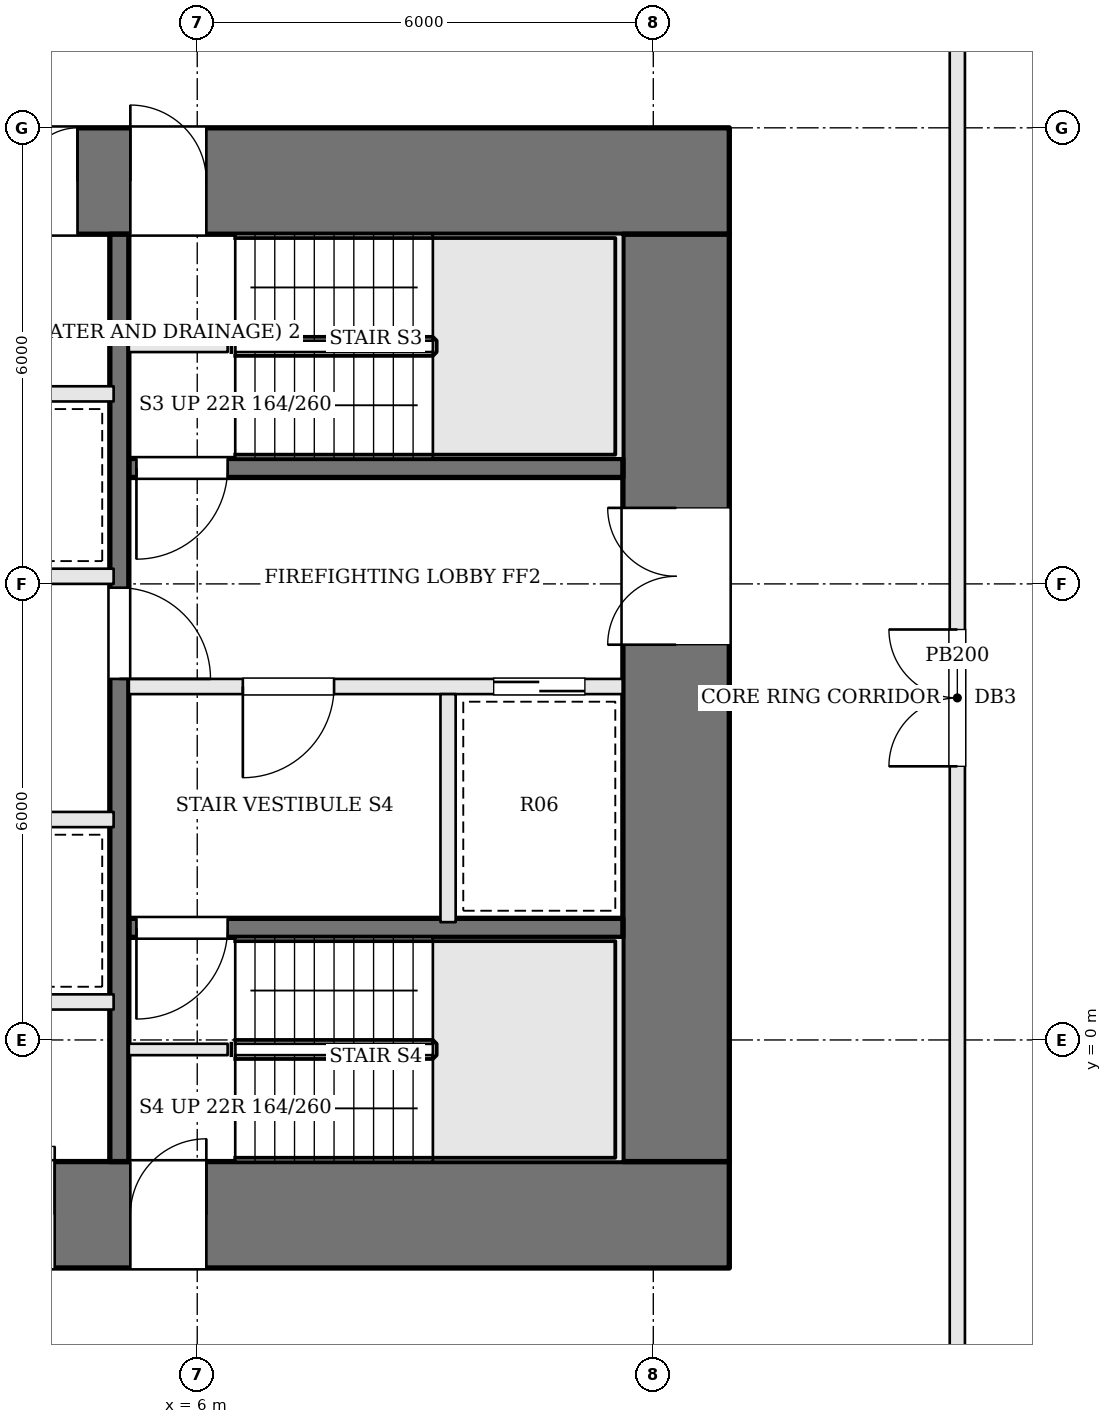
"""IFC4 building model, lengths in metres.
Left out: names, types, materials, properties, quantities, classifications, styles, units other than length and angle.
Written with IfcOpenShell. Run it as: python <this file> out.ifc"""

import sys

from ifc_helpers import new_model, si_unit, direction, frame, frame_2d, origin, place, context, subcontext, project, spatial, rectangle, extrude, element, fill, save


model = new_model("IFC4")
c1 = context("Model", 3, precision=1e-05, world=origin(), true_north=direction((0.0, 1.0)))
c2 = subcontext(c1, "Body", "Model", "MODEL_VIEW")
j1 = project(units=[si_unit("LENGTHUNIT", "METRE"), si_unit("PLANEANGLEUNIT", "RADIAN")], contexts=[c1])
p1 = place(None, origin())
s1 = spatial("IfcSite", under=j1, at=p1, CompositionType="ELEMENT")
p2 = place(p1, origin())
s2 = spatial("IfcBuilding", under=s1, at=p2, CompositionType="ELEMENT")
p3 = place(p2, frame((0.0, 0.0, 55.5)))
s3 = spatial("IfcBuildingStorey", under=s2, at=p3, CompositionType="ELEMENT", Elevation=55.5)
p4 = place(p3, frame((-13.0, 11.3, 0.0), z_axis=(0.0, 0.0, 1.0), x_axis=(1.0, 0.0, 0.0)))
e1 = element("IfcWall", 1, at=p4, inside=s3, PredefinedType="SHEAR", context=c2, shape_type="SweptSolid", body=[
    extrude(rectangle(XDim=26.0, YDim=1.4, at=frame_2d((13.0, 0.0))), origin(), (0.0, 0.0, 1.0), 3.6),
])
p5 = place(p4, frame((8.875, 0.0, 0.0)))
e2 = element("IfcOpeningElement", 2, at=p5, cuts=e1, PredefinedType="OPENING", context=c2, shape_type="SweptSolid", body=[
    extrude(rectangle(XDim=0.9, YDim=2.1, at=frame_2d((0.45, 1.05))), frame((0.0, 0.71, 0.0), z_axis=(0.0, -1.0, 0.0), x_axis=(1.0, 0.0, 0.0)), (0.0, 0.0, 1.0), 1.42),
])
p6 = place(p4, frame((11.425, 0.0, 0.0)))
e3 = element("IfcOpeningElement", 3, at=p6, cuts=e1, PredefinedType="OPENING", context=c2, shape_type="SweptSolid", body=[
    extrude(rectangle(XDim=0.7, YDim=2.1, at=frame_2d((0.35, 1.05))), frame((0.0, 0.71, 0.0), z_axis=(0.0, -1.0, 0.0), x_axis=(1.0, 0.0, 0.0)), (0.0, 0.0, 1.0), 1.42),
])
p7 = place(p4, frame((14.125, 0.0, 0.0)))
e4 = element("IfcOpeningElement", 4, at=p7, cuts=e1, PredefinedType="OPENING", context=c2, shape_type="SweptSolid", body=[
    extrude(rectangle(XDim=1.0, YDim=2.1, at=frame_2d((0.5, 1.05))), frame((0.0, 0.71, 0.0), z_axis=(0.0, -1.0, 0.0), x_axis=(1.0, 0.0, 0.0)), (0.0, 0.0, 1.0), 1.42),
])
p8 = place(p4, frame((16.725, 0.0, 0.0)))
e5 = element("IfcOpeningElement", 5, at=p8, cuts=e1, PredefinedType="OPENING", context=c2, shape_type="SweptSolid", body=[
    extrude(rectangle(XDim=0.7, YDim=2.1, at=frame_2d((0.35, 1.05))), frame((0.0, 0.71, 0.0), z_axis=(0.0, -1.0, 0.0), x_axis=(1.0, 0.0, 0.0)), (0.0, 0.0, 1.0), 1.42),
])
p9 = place(p4, frame((6.88, 0.0, 0.0)))
e6 = element("IfcOpeningElement", 6, at=p9, cuts=e1, PredefinedType="OPENING", context=c2, shape_type="SweptSolid", body=[
    extrude(rectangle(XDim=1.0, YDim=2.1, at=frame_2d((0.5, 1.05))), frame((0.0, 0.71, 0.0), z_axis=(0.0, -1.0, 0.0), x_axis=(1.0, 0.0, 0.0)), (0.0, 0.0, 1.0), 1.42),
])
p10 = place(p4, frame((18.12, 0.0, 0.0)))
e7 = element("IfcOpeningElement", 7, at=p10, cuts=e1, PredefinedType="OPENING", context=c2, shape_type="SweptSolid", body=[
    extrude(rectangle(XDim=1.0, YDim=2.1, at=frame_2d((0.5, 1.05))), frame((0.0, 0.71, 0.0), z_axis=(0.0, -1.0, 0.0), x_axis=(1.0, 0.0, 0.0)), (0.0, 0.0, 1.0), 1.42),
])
p11 = place(p3, frame((-13.0, -2.3, 0.0), z_axis=(0.0, 0.0, 1.0), x_axis=(1.0, 0.0, 0.0)))
e8 = element("IfcWall", 8, at=p11, inside=s3, PredefinedType="SHEAR", context=c2, shape_type="SweptSolid", body=[
    extrude(rectangle(XDim=26.0, YDim=1.4, at=frame_2d((13.0, 0.0))), origin(), (0.0, 0.0, 1.0), 3.6),
])
p12 = place(p11, frame((9.225, 0.0, 0.0)))
e9 = element("IfcOpeningElement", 9, at=p12, cuts=e8, PredefinedType="OPENING", context=c2, shape_type="SweptSolid", body=[
    extrude(rectangle(XDim=1.0, YDim=2.1, at=frame_2d((0.5, 1.05))), frame((0.0, 0.71, 0.0), z_axis=(0.0, -1.0, 0.0), x_axis=(1.0, 0.0, 0.0)), (0.0, 0.0, 1.0), 1.42),
])
p13 = place(p11, frame((11.825, 0.0, 0.0)))
e10 = element("IfcOpeningElement", 10, at=p13, cuts=e8, PredefinedType="OPENING", context=c2, shape_type="SweptSolid", body=[
    extrude(rectangle(XDim=0.7, YDim=2.1, at=frame_2d((0.35, 1.05))), frame((0.0, 0.71, 0.0), z_axis=(0.0, -1.0, 0.0), x_axis=(1.0, 0.0, 0.0)), (0.0, 0.0, 1.0), 1.42),
])
p14 = place(p11, frame((13.875, 0.0, 0.0)))
e11 = element("IfcOpeningElement", 11, at=p14, cuts=e8, PredefinedType="OPENING", context=c2, shape_type="SweptSolid", body=[
    extrude(rectangle(XDim=0.7, YDim=2.1, at=frame_2d((0.35, 1.05))), frame((0.0, 0.71, 0.0), z_axis=(0.0, -1.0, 0.0), x_axis=(1.0, 0.0, 0.0)), (0.0, 0.0, 1.0), 1.42),
])
p15 = place(p11, frame((16.225, 0.0, 0.0)))
e12 = element("IfcOpeningElement", 12, at=p15, cuts=e8, PredefinedType="OPENING", context=c2, shape_type="SweptSolid", body=[
    extrude(rectangle(XDim=0.9, YDim=2.1, at=frame_2d((0.45, 1.05))), frame((0.0, 0.71, 0.0), z_axis=(0.0, -1.0, 0.0), x_axis=(1.0, 0.0, 0.0)), (0.0, 0.0, 1.0), 1.42),
])
p16 = place(p11, frame((6.88, 0.0, 0.0)))
e13 = element("IfcOpeningElement", 13, at=p16, cuts=e8, PredefinedType="OPENING", context=c2, shape_type="SweptSolid", body=[
    extrude(rectangle(XDim=1.0, YDim=2.1, at=frame_2d((0.5, 1.05))), frame((0.0, 0.71, 0.0), z_axis=(0.0, -1.0, 0.0), x_axis=(1.0, 0.0, 0.0)), (0.0, 0.0, 1.0), 1.42),
])
p17 = place(p11, frame((18.12, 0.0, 0.0)))
e14 = element("IfcOpeningElement", 14, at=p17, cuts=e8, PredefinedType="OPENING", context=c2, shape_type="SweptSolid", body=[
    extrude(rectangle(XDim=1.0, YDim=2.1, at=frame_2d((0.5, 1.05))), frame((0.0, 0.71, 0.0), z_axis=(0.0, -1.0, 0.0), x_axis=(1.0, 0.0, 0.0)), (0.0, 0.0, 1.0), 1.42),
])
p18 = place(p3, frame((12.3, -1.6, 0.0), z_axis=(0.0, 0.0, 1.0), x_axis=(0.0, 1.0, 0.0)))
e15 = element("IfcWall", 15, at=p18, inside=s3, PredefinedType="SHEAR", context=c2, shape_type="SweptSolid", body=[
    extrude(rectangle(XDim=12.2, YDim=1.4, at=frame_2d((6.1, 0.0))), origin(), (0.0, 0.0, 1.0), 3.6),
])
p19 = place(p18, frame((6.8, 0.0, 0.0)))
e16 = element("IfcOpeningElement", 16, at=p19, cuts=e15, PredefinedType="OPENING", context=c2, shape_type="SweptSolid", body=[
    extrude(rectangle(XDim=1.8, YDim=2.1, at=frame_2d((0.9, 1.05))), frame((0.0, 0.71, 0.0), z_axis=(0.0, -1.0, 0.0), x_axis=(1.0, 0.0, 0.0)), (0.0, 0.0, 1.0), 1.42),
])
for number, where, z_axis, x_axis in (
    (17, (6.4, 9.125, 0.0), (0.0, 0.0, 1.0), (-1.0, 0.0, 0.0)),
    (18, (6.4, -0.125, 0.0), (0.0, 0.0, 1.0), (-1.0, 0.0, 0.0)),
):
    element("IfcWall", number, at=place(p3, frame(where, z_axis=z_axis, x_axis=x_axis)), inside=s3, PredefinedType="SOLIDWALL", context=c2, shape_type="SweptSolid", body=[
        extrude(rectangle(XDim=1.3, YDim=0.15, at=frame_2d((0.65, 0.0))), origin(), (0.0, 0.0, 1.0), 3.4),
    ])
p20 = place(p3, frame((11.6, 7.525, 0.0), z_axis=(0.0, 0.0, 1.0), x_axis=(-1.0, 0.0, 0.0)))
e19 = element("IfcWall", 19, at=p20, inside=s3, PredefinedType="SOLIDWALL", context=c2, shape_type="SweptSolid", body=[
    extrude(rectangle(XDim=6.5, YDim=0.25, at=frame_2d((3.25, 0.0))), origin(), (0.0, 0.0, 1.0), 3.4),
])
p21 = place(p20, frame((5.2, 0.0, 0.0)))
e20 = element("IfcOpeningElement", 20, at=p21, cuts=e19, PredefinedType="OPENING", context=c2, shape_type="SweptSolid", body=[
    extrude(rectangle(XDim=1.2, YDim=2.1, at=frame_2d((0.6, 1.05))), frame((0.0, 0.135, 0.0), z_axis=(0.0, -1.0, 0.0), x_axis=(1.0, 0.0, 0.0)), (0.0, 0.0, 1.0), 0.27),
])
p22 = place(p3, frame((11.6, 4.65, 0.0), z_axis=(0.0, 0.0, 1.0), x_axis=(-1.0, 0.0, 0.0)))
e21 = element("IfcWall", 21, at=p22, inside=s3, PredefinedType="SOLIDWALL", context=c2, shape_type="SweptSolid", body=[
    extrude(rectangle(XDim=6.5, YDim=0.2, at=frame_2d((3.25, 0.0))), origin(), (0.0, 0.0, 1.0), 3.4),
])
p23 = place(p22, frame((3.8, 0.0, 0.0)))
e22 = element("IfcOpeningElement", 22, at=p23, cuts=e21, PredefinedType="OPENING", context=c2, shape_type="SweptSolid", body=[
    extrude(rectangle(XDim=1.2, YDim=2.1, at=frame_2d((0.6, 1.05))), frame((0.0, 0.11, 0.0), z_axis=(0.0, -1.0, 0.0), x_axis=(1.0, 0.0, 0.0)), (0.0, 0.0, 1.0), 0.22),
])
p24 = place(p22, frame((0.5, 0.0, 0.0)))
e23 = element("IfcOpeningElement", 23, at=p24, cuts=e21, PredefinedType="OPENING", context=c2, shape_type="SweptSolid", body=[
    extrude(rectangle(XDim=1.2, YDim=2.1, at=frame_2d((0.6, 1.05))), frame((0.0, 0.11, 0.0), z_axis=(0.0, -1.0, 0.0), x_axis=(1.0, 0.0, 0.0)), (0.0, 0.0, 1.0), 0.22),
])
p25 = place(p3, frame((11.6, 1.475, 0.0), z_axis=(0.0, 0.0, 1.0), x_axis=(-1.0, 0.0, 0.0)))
e24 = element("IfcWall", 24, at=p25, inside=s3, PredefinedType="SOLIDWALL", context=c2, shape_type="SweptSolid", body=[
    extrude(rectangle(XDim=6.5, YDim=0.25, at=frame_2d((3.25, 0.0))), origin(), (0.0, 0.0, 1.0), 3.4),
])
p26 = place(p25, frame((5.2, 0.0, 0.0)))
e25 = element("IfcOpeningElement", 25, at=p26, cuts=e24, PredefinedType="OPENING", context=c2, shape_type="SweptSolid", body=[
    extrude(rectangle(XDim=1.2, YDim=2.1, at=frame_2d((0.6, 1.05))), frame((0.0, 0.135, 0.0), z_axis=(0.0, -1.0, 0.0), x_axis=(1.0, 0.0, 0.0)), (0.0, 0.0, 1.0), 0.27),
])
p27 = place(p3, frame((9.3, 4.55, 0.0), z_axis=(0.0, 0.0, 1.0), x_axis=(0.0, -1.0, 0.0)))
e26 = element("IfcWall", 26, at=p27, inside=s3, PredefinedType="SOLIDWALL", context=c2, shape_type="SweptSolid", body=[
    extrude(rectangle(XDim=3.0, YDim=0.2, at=frame_2d((1.5, 0.0))), origin(), (0.0, 0.0, 1.0), 3.4),
])
p28 = place(p3, frame((4.975, 10.6, 0.0), z_axis=(0.0, 0.0, 1.0), x_axis=(0.0, -1.0, 0.0)))
e27 = element("IfcWall", 27, at=p28, inside=s3, PredefinedType="SOLIDWALL", context=c2, shape_type="SweptSolid", body=[
    extrude(rectangle(XDim=12.2, YDim=0.25, at=frame_2d((6.1, 0.0))), origin(), (0.0, 0.0, 1.0), 3.4),
])
p29 = place(p28, frame((4.65, 0.0, 0.0)))
e28 = element("IfcOpeningElement", 28, at=p29, cuts=e27, PredefinedType="OPENING", context=c2, shape_type="SweptSolid", body=[
    extrude(rectangle(XDim=1.2, YDim=2.1, at=frame_2d((0.6, 1.05))), frame((0.0, 0.135, 0.0), z_axis=(0.0, -1.0, 0.0), x_axis=(1.0, 0.0, 0.0)), (0.0, 0.0, 1.0), 0.27),
])
for number, where, z_axis, x_axis in (
    (29, (-4.9, 0.5, 0.0), (0.0, 0.0, 1.0), (1.0, 0.0, 0.0)),
    (30, (-4.9, 2.9, 0.0), (0.0, 0.0, 1.0), (1.0, 0.0, 0.0)),
    (31, (-4.9, 6.1, 0.0), (0.0, 0.0, 1.0), (1.0, 0.0, 0.0)),
    (32, (-4.9, 8.5, 0.0), (0.0, 0.0, 1.0), (1.0, 0.0, 0.0)),
):
    element("IfcWall", number, at=place(p3, frame(where, z_axis=z_axis, x_axis=x_axis)), inside=s3, PredefinedType="SOLIDWALL", context=c2, shape_type="SweptSolid", body=[
        extrude(rectangle(XDim=9.8, YDim=0.2, at=frame_2d((4.9, 0.0))), origin(), (0.0, 0.0, 1.0), 3.4),
    ])
p30 = place(p3, frame((14.436, 16.009, 0.0), z_axis=(0.0, 0.0, 1.0), x_axis=(0.863814140683, -0.503810609611, 0.0)))
e33 = element("IfcWall", 33, at=p30, inside=s3, PredefinedType="PARTITIONING", context=c2, shape_type="SweptSolid", body=[
    extrude(rectangle(XDim=6.03, YDim=0.2, at=frame_2d((3.015, 0.0))), origin(), (0.0, 0.0, 1.0), 3.4),
])
p31 = place(p3, frame((16.0, -5.9, 0.0), z_axis=(0.0, 0.0, 1.0), x_axis=(0.0, 1.0, 0.0)))
e34 = element("IfcWall", 34, at=p31, inside=s3, PredefinedType="PARTITIONING", context=c2, shape_type="SweptSolid", body=[
    extrude(rectangle(XDim=20.8, YDim=0.2, at=frame_2d((10.4, 0.0))), origin(), (0.0, 0.0, 1.0), 3.4),
])
p32 = place(p31, frame((9.5, 0.0, 0.0)))
e35 = element("IfcOpeningElement", 35, at=p32, cuts=e34, PredefinedType="OPENING", context=c2, shape_type="SweptSolid", body=[
    extrude(rectangle(XDim=1.8, YDim=2.1, at=frame_2d((0.9, 1.05))), frame((0.0, 0.11, 0.0), z_axis=(0.0, -1.0, 0.0), x_axis=(1.0, 0.0, 0.0)), (0.0, 0.0, 1.0), 0.22),
])
p33 = place(p19, origin())
e36 = element("IfcDoor", 36, at=p33, inside=s3, OperationType="DOUBLE_DOOR_SINGLE_SWING", PredefinedType="DOOR", context=c2, shape_type="SweptSolid", body=[
    extrude(rectangle(XDim=1.8, YDim=2.1, at=frame_2d((0.9, 1.05))), frame((0.0, 0.025, 0.0), z_axis=(0.0, -1.0, 0.0), x_axis=(1.0, 0.0, 0.0)), (0.0, 0.0, 1.0), 0.05),
])
fill(e16, e36)
p34 = place(p29, origin())
e37 = element("IfcDoor", 37, at=p34, inside=s3, OperationType="SINGLE_SWING_RIGHT", PredefinedType="DOOR", context=c2, shape_type="SweptSolid", body=[
    extrude(rectangle(XDim=1.2, YDim=2.1, at=frame_2d((0.6, 1.05))), frame((0.0, 0.025, 0.0), z_axis=(0.0, -1.0, 0.0), x_axis=(1.0, 0.0, 0.0)), (0.0, 0.0, 1.0), 0.05),
])
fill(e28, e37)
p35 = place(p23, origin())
e38 = element("IfcDoor", 38, at=p35, inside=s3, OperationType="SINGLE_SWING_RIGHT", PredefinedType="DOOR", context=c2, shape_type="SweptSolid", body=[
    extrude(rectangle(XDim=1.2, YDim=2.1, at=frame_2d((0.6, 1.05))), frame((0.0, 0.025, 0.0), z_axis=(0.0, -1.0, 0.0), x_axis=(1.0, 0.0, 0.0)), (0.0, 0.0, 1.0), 0.05),
])
fill(e22, e38)
p36 = place(p21, origin())
e39 = element("IfcDoor", 39, at=p36, inside=s3, OperationType="SINGLE_SWING_RIGHT", PredefinedType="DOOR", context=c2, shape_type="SweptSolid", body=[
    extrude(rectangle(XDim=1.2, YDim=2.1, at=frame_2d((0.6, 1.05))), frame((0.0, 0.025, 0.0), z_axis=(0.0, -1.0, 0.0), x_axis=(1.0, 0.0, 0.0)), (0.0, 0.0, 1.0), 0.05),
])
fill(e20, e39)
p37 = place(p26, origin())
e40 = element("IfcDoor", 40, at=p37, inside=s3, OperationType="SINGLE_SWING_RIGHT", PredefinedType="DOOR", context=c2, shape_type="SweptSolid", body=[
    extrude(rectangle(XDim=1.2, YDim=2.1, at=frame_2d((0.6, 1.05))), frame((0.0, 0.025, 0.0), z_axis=(0.0, -1.0, 0.0), x_axis=(1.0, 0.0, 0.0)), (0.0, 0.0, 1.0), 0.05),
])
fill(e25, e40)
p38 = place(p24, origin())
e41 = element("IfcDoor", 41, at=p38, inside=s3, OperationType="SLIDING_TO_RIGHT", PredefinedType="DOOR", context=c2, shape_type="SweptSolid", body=[
    extrude(rectangle(XDim=1.2, YDim=2.1, at=frame_2d((0.6, 1.05))), frame((0.0, 0.025, 0.0), z_axis=(0.0, -1.0, 0.0), x_axis=(1.0, 0.0, 0.0)), (0.0, 0.0, 1.0), 0.05),
])
fill(e23, e41)
p39 = place(p15, origin())
e42 = element("IfcDoor", 42, at=p39, inside=s3, OperationType="SINGLE_SWING_RIGHT", PredefinedType="DOOR", context=c2, shape_type="SweptSolid", body=[
    extrude(rectangle(XDim=0.9, YDim=2.1, at=frame_2d((0.45, 1.05))), frame((0.0, 0.025, 0.0), z_axis=(0.0, -1.0, 0.0), x_axis=(1.0, 0.0, 0.0)), (0.0, 0.0, 1.0), 0.05),
])
fill(e12, e42)
p40 = place(p8, origin())
e43 = element("IfcDoor", 43, at=p40, inside=s3, OperationType="SINGLE_SWING_RIGHT", PredefinedType="DOOR", context=c2, shape_type="SweptSolid", body=[
    extrude(rectangle(XDim=0.7, YDim=2.1, at=frame_2d((0.35, 1.05))), frame((0.0, 0.025, 0.0), z_axis=(0.0, -1.0, 0.0), x_axis=(1.0, 0.0, 0.0)), (0.0, 0.0, 1.0), 0.05),
])
fill(e5, e43)
p41 = place(p10, origin())
e44 = element("IfcDoor", 44, at=p41, inside=s3, OperationType="SINGLE_SWING_LEFT", PredefinedType="DOOR", context=c2, shape_type="SweptSolid", body=[
    extrude(rectangle(XDim=1.0, YDim=2.1, at=frame_2d((0.5, 1.05))), frame((0.0, 0.025, 0.0), z_axis=(0.0, -1.0, 0.0), x_axis=(1.0, 0.0, 0.0)), (0.0, 0.0, 1.0), 0.05),
])
fill(e7, e44)
p42 = place(p17, origin())
e45 = element("IfcDoor", 45, at=p42, inside=s3, OperationType="SINGLE_SWING_RIGHT", PredefinedType="DOOR", context=c2, shape_type="SweptSolid", body=[
    extrude(rectangle(XDim=1.0, YDim=2.1, at=frame_2d((0.5, 1.05))), frame((0.0, 0.025, 0.0), z_axis=(0.0, -1.0, 0.0), x_axis=(1.0, 0.0, 0.0)), (0.0, 0.0, 1.0), 0.05),
])
fill(e14, e45)
p43 = place(p32, origin())
e46 = element("IfcDoor", 46, at=p43, inside=s3, OperationType="DOUBLE_DOOR_SINGLE_SWING", PredefinedType="DOOR", context=c2, shape_type="SweptSolid", body=[
    extrude(rectangle(XDim=1.8, YDim=2.1, at=frame_2d((0.9, 1.05))), frame((0.0, 0.025, 0.0), z_axis=(0.0, -1.0, 0.0), x_axis=(1.0, 0.0, 0.0)), (0.0, 0.0, 1.0), 0.05),
])
fill(e35, e46)
save(model, sys.argv[1])
